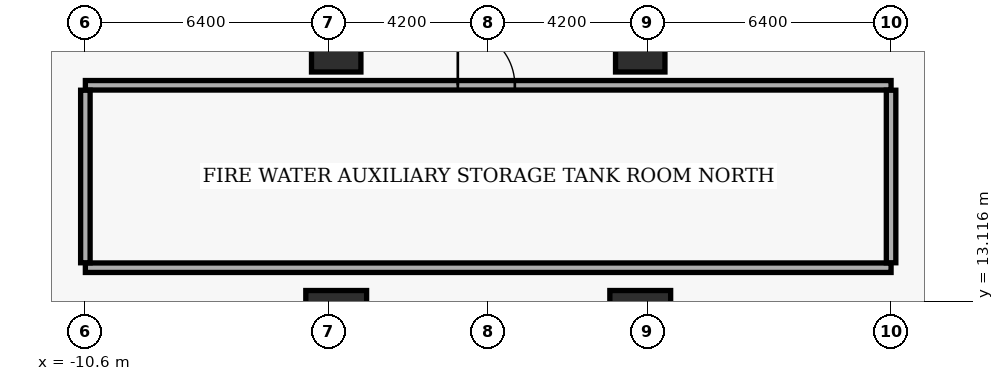
"""IFC4 building model, lengths in metres.
Left out: names, types, materials, properties, quantities, classifications, styles, units other than length and angle.
Written with IfcOpenShell. Run it as: python <this file> out.ifc"""

import sys

from ifc_helpers import new_model, si_unit, direction, frame, frame_2d, origin, origin_2d, place, context, subcontext, project, spatial, rectangle, extrude, element, fill, save


model = new_model("IFC4")
c1 = context("Model", 3, precision=1e-05, world=origin(), true_north=direction((0.0, 1.0)))
c2 = subcontext(c1, "Body", "Model", "MODEL_VIEW")
j1 = project(units=[si_unit("LENGTHUNIT", "METRE"), si_unit("PLANEANGLEUNIT", "RADIAN")], contexts=[c1])
p1 = place(None, origin())
s1 = spatial("IfcSite", under=j1, at=p1, CompositionType="ELEMENT")
p2 = place(p1, origin())
s2 = spatial("IfcBuilding", under=s1, at=p2, CompositionType="ELEMENT")
p3 = place(p2, frame((0.0, 0.0, -10.4)))
s3 = spatial("IfcBuildingStorey", under=s2, at=p3, CompositionType="ELEMENT", Elevation=-10.4)
for number, where, z_axis, x_axis in (
    (1, (4.0, 12.6, 0.0), (0.0, 0.0, 1.0), (1.0, 0.0, 0.0)),
    (2, (-4.0, 12.6, 0.0), (0.0, 0.0, 1.0), (1.0, 0.0, 0.0)),
):
    element("IfcColumn", number, at=place(p3, frame(where, z_axis=z_axis, x_axis=x_axis)), inside=s3, PredefinedType="COLUMN", context=c2, shape_type="SweptSolid", body=[
        extrude(rectangle(XDim=1.6, YDim=1.6, at=origin_2d()), origin(), (0.0, 0.0, 1.0), 5.2),
    ])
for number, where, z_axis, x_axis in (
    (3, (-4.0, 19.8, 0.0), (0.0, 0.0, 1.0), (1.0, 0.0, 0.0)),
    (4, (4.0, 19.8, 0.0), (0.0, 0.0, 1.0), (1.0, 0.0, 0.0)),
):
    element("IfcColumn", number, at=place(p3, frame(where, z_axis=z_axis, x_axis=x_axis)), inside=s3, PredefinedType="COLUMN", context=c2, shape_type="SweptSolid", body=[
        extrude(rectangle(XDim=1.3, YDim=1.3, at=origin_2d()), origin(), (0.0, 0.0, 1.0), 5.2),
    ])
p4 = place(p3, frame((-10.6, 14.0, 0.0), z_axis=(0.0, 0.0, 1.0), x_axis=(1.0, 0.0, 0.0)))
e5 = element("IfcWall", 5, at=p4, inside=s3, PredefinedType="SOLIDWALL", context=c2, shape_type="SweptSolid", body=[
    extrude(rectangle(XDim=21.2, YDim=0.25, at=frame_2d((10.6, 0.0))), origin(), (0.0, 0.0, 1.0), 3.87),
])
p5 = place(p3, frame((-10.6, 18.8, 0.0), z_axis=(0.0, 0.0, 1.0), x_axis=(1.0, 0.0, 0.0)))
e6 = element("IfcWall", 6, at=p5, inside=s3, PredefinedType="SOLIDWALL", context=c2, shape_type="SweptSolid", body=[
    extrude(rectangle(XDim=21.2, YDim=0.25, at=frame_2d((10.6, 0.0))), origin(), (0.0, 0.0, 1.0), 3.87),
])
p6 = place(p5, frame((9.8, 0.0, 0.0)))
e7 = element("IfcOpeningElement", 7, at=p6, cuts=e6, PredefinedType="OPENING", context=c2, shape_type="SweptSolid", body=[
    extrude(rectangle(XDim=1.5, YDim=2.15, at=frame_2d((0.75, 1.075))), frame((0.0, 0.135, 0.0), z_axis=(0.0, -1.0, 0.0), x_axis=(1.0, 0.0, 0.0)), (0.0, 0.0, 1.0), 0.27),
])
for number, where, z_axis, x_axis in (
    (8, (-10.6, 14.13, 0.0), (0.0, 0.0, 1.0), (0.0, 1.0, 0.0)),
    (9, (10.6, 14.13, 0.0), (0.0, 0.0, 1.0), (0.0, 1.0, 0.0)),
):
    element("IfcWall", number, at=place(p3, frame(where, z_axis=z_axis, x_axis=x_axis)), inside=s3, PredefinedType="SOLIDWALL", context=c2, shape_type="SweptSolid", body=[
        extrude(rectangle(XDim=4.54, YDim=0.25, at=frame_2d((2.27, 0.0))), origin(), (0.0, 0.0, 1.0), 3.87),
    ])
p7 = place(p6, origin())
e10 = element("IfcDoor", 10, at=p7, inside=s3, OperationType="DOUBLE_DOOR_SINGLE_SWING", PredefinedType="DOOR", context=c2, shape_type="SweptSolid", body=[
    extrude(rectangle(XDim=1.5, YDim=2.15, at=frame_2d((0.75, 1.075))), frame((0.0, 0.025, 0.0), z_axis=(0.0, -1.0, 0.0), x_axis=(1.0, 0.0, 0.0)), (0.0, 0.0, 1.0), 0.05),
])
fill(e7, e10)
save(model, sys.argv[1])
